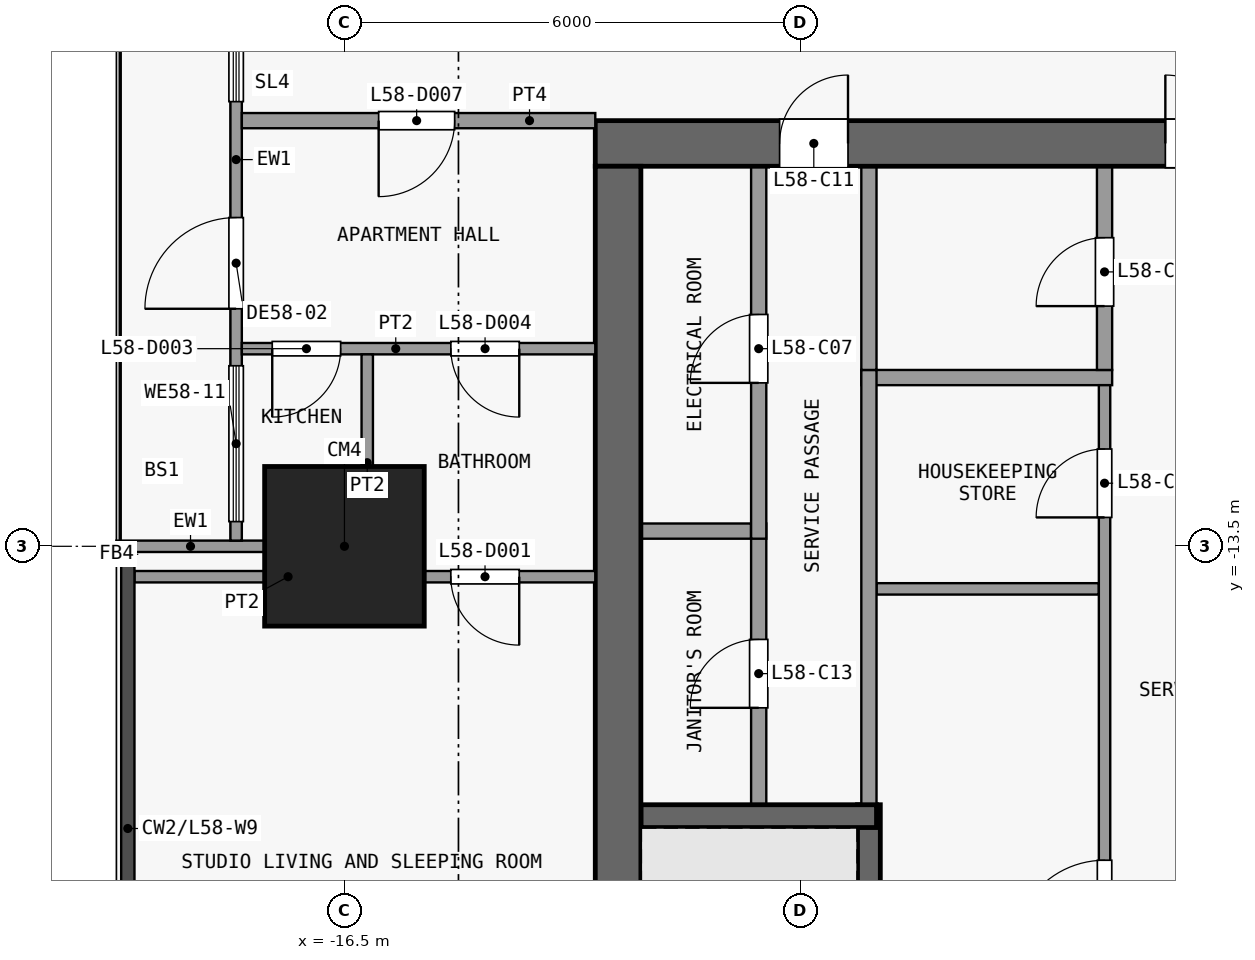
"""IFC4 building model, lengths in metres.
Left out: names, types, materials, properties, quantities, classifications, styles, units other than length and angle.
Written with IfcOpenShell. Run it as: python <this file> out.ifc"""

import sys

from ifc_helpers import new_model, si_unit, direction, frame, frame_2d, origin, origin_2d, place, context, subcontext, project, spatial, rectangle, extrude, element, fill, save


model = new_model("IFC4")
c1 = context("Model", 3, precision=1e-05, world=origin(), true_north=direction((0.0, 1.0)))
c2 = subcontext(c1, "Body", "Model", "MODEL_VIEW")
j1 = project(units=[si_unit("LENGTHUNIT", "METRE"), si_unit("PLANEANGLEUNIT", "RADIAN")], contexts=[c1])
p1 = place(None, origin())
s1 = spatial("IfcSite", under=j1, at=p1, CompositionType="ELEMENT")
p2 = place(p1, origin())
s2 = spatial("IfcBuilding", under=s1, at=p2, CompositionType="ELEMENT")
p3 = place(p2, frame((0.0, 0.0, 230.3)))
s3 = spatial("IfcBuildingStorey", under=s2, at=p3, CompositionType="ELEMENT", Elevation=230.3)
p4 = place(p3, frame((-16.5, -13.5, 0.0), z_axis=(0.0, 0.0, 1.0), x_axis=(1.0, 0.0, 0.0)))
e1 = element("IfcColumn", 1, at=p4, inside=s3, PredefinedType="COLUMN", context=c2, shape_type="SweptSolid", body=[
    extrude(rectangle(XDim=2.1, YDim=2.1, at=origin_2d()), origin(), (0.0, 0.0, 1.0), 3.6),
])
p5 = place(p3, frame((-13.2, -8.2, 0.0), z_axis=(0.0, 0.0, 1.0), x_axis=(1.0, 0.0, 0.0)))
e2 = element("IfcWall", 2, at=p5, inside=s3, PredefinedType="SHEAR", context=c2, shape_type="SweptSolid", body=[
    extrude(rectangle(XDim=26.4, YDim=0.6, at=frame_2d((13.2, 0.0))), origin(), (0.0, 0.0, 1.0), 3.3),
])
p6 = place(p5, frame((7.5, 0.0, 0.0)))
e3 = element("IfcOpeningElement", 3, at=p6, cuts=e2, PredefinedType="OPENING", context=c2, shape_type="SweptSolid", body=[
    extrude(rectangle(XDim=1.8, YDim=2.1, at=frame_2d((0.9, 1.05))), frame((0.0, 0.31, 0.0), z_axis=(0.0, -1.0, 0.0), x_axis=(1.0, 0.0, 0.0)), (0.0, 0.0, 1.0), 0.62),
])
p7 = place(p5, frame((17.1, 0.0, 0.0)))
e4 = element("IfcOpeningElement", 4, at=p7, cuts=e2, PredefinedType="OPENING", context=c2, shape_type="SweptSolid", body=[
    extrude(rectangle(XDim=1.8, YDim=2.1, at=frame_2d((0.9, 1.05))), frame((0.0, 0.31, 0.0), z_axis=(0.0, -1.0, 0.0), x_axis=(1.0, 0.0, 0.0)), (0.0, 0.0, 1.0), 0.62),
])
p8 = place(p5, frame((2.425, 0.0, 0.0)))
e5 = element("IfcOpeningElement", 5, at=p8, cuts=e2, PredefinedType="OPENING", context=c2, shape_type="SweptSolid", body=[
    extrude(rectangle(XDim=0.9, YDim=2.1, at=frame_2d((0.45, 1.05))), frame((0.0, 0.31, 0.0), z_axis=(0.0, -1.0, 0.0), x_axis=(1.0, 0.0, 0.0)), (0.0, 0.0, 1.0), 0.62),
])
p9 = place(p5, frame((23.075, 0.0, 0.0)))
e6 = element("IfcOpeningElement", 6, at=p9, cuts=e2, PredefinedType="OPENING", context=c2, shape_type="SweptSolid", body=[
    extrude(rectangle(XDim=0.9, YDim=2.1, at=frame_2d((0.45, 1.05))), frame((0.0, 0.31, 0.0), z_axis=(0.0, -1.0, 0.0), x_axis=(1.0, 0.0, 0.0)), (0.0, 0.0, 1.0), 0.62),
])
p10 = place(p3, frame((-12.9, -24.6, 0.0), z_axis=(0.0, 0.0, 1.0), x_axis=(0.0, 1.0, 0.0)))
e7 = element("IfcWall", 7, at=p10, inside=s3, PredefinedType="SHEAR", context=c2, shape_type="SweptSolid", body=[
    extrude(rectangle(XDim=16.1, YDim=0.6, at=frame_2d((8.05, 0.0))), origin(), (0.0, 0.0, 1.0), 3.3),
])
p11 = place(p3, frame((-12.6, -17.05, 0.0), z_axis=(0.0, 0.0, 1.0), x_axis=(1.0, 0.0, 0.0)))
e8 = element("IfcWall", 8, at=p11, inside=s3, PredefinedType="SHEAR", context=c2, shape_type="SweptSolid", body=[
    extrude(rectangle(XDim=3.1, YDim=0.3, at=frame_2d((1.55, 0.0))), origin(), (0.0, 0.0, 1.0), 3.3),
])
p12 = place(p3, frame((-9.5, -14.06, 0.0), z_axis=(0.0, 0.0, 1.0), x_axis=(1.0, 0.0, 0.0)))
e9 = element("IfcWall", 9, at=p12, inside=s3, PredefinedType="PARTITIONING", context=c2, shape_type="SweptSolid", body=[
    extrude(rectangle(XDim=2.925, YDim=0.15, at=frame_2d((1.462, 0.0))), origin(), (0.0, 0.0, 1.0), 3.3),
])
p13 = place(p3, frame((-12.6, -13.3, 0.0), z_axis=(0.0, 0.0, 1.0), x_axis=(1.0, 0.0, 0.0)))
e10 = element("IfcWall", 10, at=p13, inside=s3, PredefinedType="PARTITIONING", context=c2, shape_type="SweptSolid", body=[
    extrude(rectangle(XDim=1.45, YDim=0.2, at=frame_2d((0.725, 0.0))), origin(), (0.0, 0.0, 1.0), 3.3),
])
p14 = place(p3, frame((-9.7, -11.28, 0.0), z_axis=(0.0, 0.0, 1.0), x_axis=(1.0, 0.0, 0.0)))
e11 = element("IfcWall", 11, at=p14, inside=s3, PredefinedType="PARTITIONING", context=c2, shape_type="SweptSolid", body=[
    extrude(rectangle(XDim=3.3, YDim=0.2, at=frame_2d((1.65, 0.0))), origin(), (0.0, 0.0, 1.0), 3.3),
])
p15 = place(p3, frame((-11.05, -16.9, 0.0), z_axis=(0.0, 0.0, 1.0), x_axis=(0.0, 1.0, 0.0)))
e12 = element("IfcWall", 12, at=p15, inside=s3, PredefinedType="PARTITIONING", context=c2, shape_type="SweptSolid", body=[
    extrude(rectangle(XDim=3.7, YDim=0.2, at=frame_2d((1.85, 0.0))), origin(), (0.0, 0.0, 1.0), 3.3),
])
p16 = place(p15, frame((1.275, 0.0, 0.0)))
e13 = element("IfcOpeningElement", 13, at=p16, cuts=e12, PredefinedType="OPENING", context=c2, shape_type="SweptSolid", body=[
    extrude(rectangle(XDim=0.9, YDim=2.1, at=frame_2d((0.45, 1.05))), frame((0.0, 0.11, 0.0), z_axis=(0.0, -1.0, 0.0), x_axis=(1.0, 0.0, 0.0)), (0.0, 0.0, 1.0), 0.22),
])
p17 = place(p3, frame((-11.05, -13.4, 0.0), z_axis=(0.0, 0.0, 1.0), x_axis=(0.0, 1.0, 0.0)))
e14 = element("IfcWall", 14, at=p17, inside=s3, PredefinedType="PARTITIONING", context=c2, shape_type="SweptSolid", body=[
    extrude(rectangle(XDim=4.9, YDim=0.2, at=frame_2d((2.45, 0.0))), origin(), (0.0, 0.0, 1.0), 3.3),
])
p18 = place(p17, frame((2.05, 0.0, 0.0)))
e15 = element("IfcOpeningElement", 15, at=p18, cuts=e14, PredefinedType="OPENING", context=c2, shape_type="SweptSolid", body=[
    extrude(rectangle(XDim=0.9, YDim=2.1, at=frame_2d((0.45, 1.05))), frame((0.0, 0.11, 0.0), z_axis=(0.0, -1.0, 0.0), x_axis=(1.0, 0.0, 0.0)), (0.0, 0.0, 1.0), 0.22),
])
p19 = place(p3, frame((-9.6, -24.6, 0.0), z_axis=(0.0, 0.0, 1.0), x_axis=(0.0, 1.0, 0.0)))
e16 = element("IfcWall", 16, at=p19, inside=s3, PredefinedType="SHEAR", context=c2, shape_type="SweptSolid", body=[
    extrude(rectangle(XDim=7.7, YDim=0.3, at=frame_2d((3.85, 0.0))), origin(), (0.0, 0.0, 1.0), 3.3),
])
p20 = place(p19, frame((0.1, 0.0, 0.0)))
e17 = element("IfcOpeningElement", 17, at=p20, cuts=e16, PredefinedType="OPENING", context=c2, shape_type="SweptSolid", body=[
    extrude(rectangle(XDim=1.1, YDim=2.1, at=frame_2d((0.55, 1.05))), frame((0.0, 0.16, 0.0), z_axis=(0.0, -1.0, 0.0), x_axis=(1.0, 0.0, 0.0)), (0.0, 0.0, 1.0), 0.32),
])
p21 = place(p3, frame((-9.6, -16.9, 0.0), z_axis=(0.0, 0.0, 1.0), x_axis=(0.0, 1.0, 0.0)))
e18 = element("IfcWall", 18, at=p21, inside=s3, PredefinedType="PARTITIONING", context=c2, shape_type="SweptSolid", body=[
    extrude(rectangle(XDim=5.72, YDim=0.2, at=frame_2d((2.86, 0.0))), origin(), (0.0, 0.0, 1.0), 3.3),
])
p22 = place(p3, frame((-9.6, -11.18, 0.0), z_axis=(0.0, 0.0, 1.0), x_axis=(0.0, 1.0, 0.0)))
e19 = element("IfcWall", 19, at=p22, inside=s3, PredefinedType="PARTITIONING", context=c2, shape_type="SweptSolid", body=[
    extrude(rectangle(XDim=2.68, YDim=0.2, at=frame_2d((1.34, 0.0))), origin(), (0.0, 0.0, 1.0), 3.3),
])
p23 = place(p3, frame((-6.5, -22.3, 0.0), z_axis=(0.0, 0.0, 1.0), x_axis=(0.0, 1.0, 0.0)))
e20 = element("IfcWall", 20, at=p23, inside=s3, PredefinedType="PARTITIONING", context=c2, shape_type="SweptSolid", body=[
    extrude(rectangle(XDim=10.92, YDim=0.15, at=frame_2d((5.46, 0.0))), origin(), (0.0, 0.0, 1.0), 3.3),
])
p24 = place(p23, frame((3.47, 0.0, 0.0)))
e21 = element("IfcOpeningElement", 21, at=p24, cuts=e20, PredefinedType="OPENING", context=c2, shape_type="SweptSolid", body=[
    extrude(rectangle(XDim=1.2, YDim=2.1, at=frame_2d((0.6, 1.05))), frame((0.0, 0.085, 0.0), z_axis=(0.0, -1.0, 0.0), x_axis=(1.0, 0.0, 0.0)), (0.0, 0.0, 1.0), 0.17),
])
p25 = place(p23, frame((9.18, 0.0, 0.0)))
e22 = element("IfcOpeningElement", 22, at=p25, cuts=e20, PredefinedType="OPENING", context=c2, shape_type="SweptSolid", body=[
    extrude(rectangle(XDim=0.9, YDim=2.1, at=frame_2d((0.45, 1.05))), frame((0.0, 0.085, 0.0), z_axis=(0.0, -1.0, 0.0), x_axis=(1.0, 0.0, 0.0)), (0.0, 0.0, 1.0), 0.17),
])
p26 = place(p3, frame((-6.5, -11.18, 0.0), z_axis=(0.0, 0.0, 1.0), x_axis=(0.0, 1.0, 0.0)))
e23 = element("IfcWall", 23, at=p26, inside=s3, PredefinedType="PARTITIONING", context=c2, shape_type="SweptSolid", body=[
    extrude(rectangle(XDim=2.68, YDim=0.2, at=frame_2d((1.34, 0.0))), origin(), (0.0, 0.0, 1.0), 3.3),
])
p27 = place(p26, frame((0.84, 0.0, 0.0)))
e24 = element("IfcOpeningElement", 24, at=p27, cuts=e23, PredefinedType="OPENING", context=c2, shape_type="SweptSolid", body=[
    extrude(rectangle(XDim=0.9, YDim=2.1, at=frame_2d((0.45, 1.05))), frame((0.0, 0.11, 0.0), z_axis=(0.0, -1.0, 0.0), x_axis=(1.0, 0.0, 0.0)), (0.0, 0.0, 1.0), 0.22),
])
p28 = place(p3, frame((-17.55, -13.5, 0.0), z_axis=(0.0, 0.0, 1.0), x_axis=(-1.0, 0.0, 0.0)))
e25 = element("IfcWall", 25, at=p28, inside=s3, PredefinedType="SOLIDWALL", context=c2, shape_type="SweptSolid", body=[
    extrude(rectangle(XDim=1.95, YDim=0.15, at=frame_2d((0.975, 0.0))), origin(), (0.0, 0.0, 1.0), 3.3),
])
p29 = place(p3, frame((-17.925, -13.425, 0.0), z_axis=(0.0, 0.0, 1.0), x_axis=(0.0, 1.0, 0.0)))
e26 = element("IfcWall", 26, at=p29, inside=s3, PredefinedType="SOLIDWALL", context=c2, shape_type="SweptSolid", body=[
    extrude(rectangle(XDim=8.85, YDim=0.15, at=frame_2d((4.425, 0.0))), origin(), (0.0, 0.0, 1.0), 3.3),
])
p30 = place(p29, frame((3.05, 0.0, 0.0)))
e27 = element("IfcOpeningElement", 27, at=p30, cuts=e26, PredefinedType="OPENING", context=c2, shape_type="SweptSolid", body=[
    extrude(rectangle(XDim=1.2, YDim=2.4, at=frame_2d((0.6, 1.2))), frame((0.0, 0.085, 0.0), z_axis=(0.0, -1.0, 0.0), x_axis=(1.0, 0.0, 0.0)), (0.0, 0.0, 1.0), 0.17),
])
p31 = place(p29, frame((0.25, 0.0, 0.9)))
e28 = element("IfcOpeningElement", 28, at=p31, cuts=e26, PredefinedType="OPENING", context=c2, shape_type="SweptSolid", body=[
    extrude(rectangle(XDim=2.05, YDim=2.1, at=frame_2d((1.025, 1.05))), frame((0.0, 0.085, 0.0), z_axis=(0.0, -1.0, 0.0), x_axis=(1.0, 0.0, 0.0)), (0.0, 0.0, 1.0), 0.17),
])
p32 = place(p29, frame((5.775, 0.0, 0.9)))
e29 = element("IfcOpeningElement", 29, at=p32, cuts=e26, PredefinedType="OPENING", context=c2, shape_type="SweptSolid", body=[
    extrude(rectangle(XDim=2.275, YDim=2.1, at=frame_2d((1.137, 1.05))), frame((0.0, 0.085, 0.0), z_axis=(0.0, -1.0, 0.0), x_axis=(1.0, 0.0, 0.0)), (0.0, 0.0, 1.0), 0.17),
])
p33 = place(p3, frame((-19.262, -13.9, 0.0), z_axis=(0.0, 0.0, 1.0), x_axis=(1.0, 0.0, 0.0)))
e30 = element("IfcWall", 30, at=p33, inside=s3, PredefinedType="PARTITIONING", context=c2, shape_type="SweptSolid", body=[
    extrude(rectangle(XDim=6.062, YDim=0.15, at=frame_2d((3.031, 0.0))), origin(), (0.0, 0.0, 1.0), 3.3),
])
p34 = place(p33, frame((4.162, 0.0, 0.0)))
e31 = element("IfcOpeningElement", 31, at=p34, cuts=e30, PredefinedType="OPENING", context=c2, shape_type="SweptSolid", body=[
    extrude(rectangle(XDim=0.9, YDim=2.1, at=frame_2d((0.45, 1.05))), frame((0.0, 0.085, 0.0), z_axis=(0.0, -1.0, 0.0), x_axis=(1.0, 0.0, 0.0)), (0.0, 0.0, 1.0), 0.17),
])
p35 = place(p3, frame((-17.85, -10.9, 0.0), z_axis=(0.0, 0.0, 1.0), x_axis=(1.0, 0.0, 0.0)))
e32 = element("IfcWall", 32, at=p35, inside=s3, PredefinedType="PARTITIONING", context=c2, shape_type="SweptSolid", body=[
    extrude(rectangle(XDim=4.65, YDim=0.15, at=frame_2d((2.325, 0.0))), origin(), (0.0, 0.0, 1.0), 3.3),
])
p36 = place(p35, frame((0.4, 0.0, 0.0)))
e33 = element("IfcOpeningElement", 33, at=p36, cuts=e32, PredefinedType="OPENING", context=c2, shape_type="SweptSolid", body=[
    extrude(rectangle(XDim=0.9, YDim=2.1, at=frame_2d((0.45, 1.05))), frame((0.0, 0.085, 0.0), z_axis=(0.0, -1.0, 0.0), x_axis=(1.0, 0.0, 0.0)), (0.0, 0.0, 1.0), 0.17),
])
p37 = place(p35, frame((2.75, 0.0, 0.0)))
e34 = element("IfcOpeningElement", 34, at=p37, cuts=e32, PredefinedType="OPENING", context=c2, shape_type="SweptSolid", body=[
    extrude(rectangle(XDim=0.9, YDim=2.1, at=frame_2d((0.45, 1.05))), frame((0.0, 0.085, 0.0), z_axis=(0.0, -1.0, 0.0), x_axis=(1.0, 0.0, 0.0)), (0.0, 0.0, 1.0), 0.17),
])
p38 = place(p3, frame((-17.85, -7.9, 0.0), z_axis=(0.0, 0.0, 1.0), x_axis=(1.0, 0.0, 0.0)))
e35 = element("IfcWall", 35, at=p38, inside=s3, PredefinedType="PARTITIONING", context=c2, shape_type="SweptSolid", body=[
    extrude(rectangle(XDim=4.65, YDim=0.2, at=frame_2d((2.325, 0.0))), origin(), (0.0, 0.0, 1.0), 3.3),
])
p39 = place(p38, frame((1.8, 0.0, 0.0)))
e36 = element("IfcOpeningElement", 36, at=p39, cuts=e35, PredefinedType="OPENING", context=c2, shape_type="SweptSolid", body=[
    extrude(rectangle(XDim=1.0, YDim=2.1, at=frame_2d((0.5, 1.05))), frame((0.0, 0.11, 0.0), z_axis=(0.0, -1.0, 0.0), x_axis=(1.0, 0.0, 0.0)), (0.0, 0.0, 1.0), 0.22),
])
p40 = place(p3, frame((-16.2, -13.825, 0.0), z_axis=(0.0, 0.0, 1.0), x_axis=(0.0, 1.0, 0.0)))
e37 = element("IfcWall", 37, at=p40, inside=s3, PredefinedType="PARTITIONING", context=c2, shape_type="SweptSolid", body=[
    extrude(rectangle(XDim=2.85, YDim=0.15, at=frame_2d((1.425, 0.0))), origin(), (0.0, 0.0, 1.0), 3.3),
])
p41 = place(p6, origin())
e38 = element("IfcDoor", 38, at=p41, inside=s3, OperationType="DOUBLE_DOOR_SINGLE_SWING", PredefinedType="DOOR", context=c2, shape_type="SweptSolid", body=[
    extrude(rectangle(XDim=1.8, YDim=2.1, at=frame_2d((0.9, 1.05))), frame((0.0, 0.025, 0.0), z_axis=(0.0, -1.0, 0.0), x_axis=(1.0, 0.0, 0.0)), (0.0, 0.0, 1.0), 0.05),
])
fill(e3, e38)
p42 = place(p18, origin())
e39 = element("IfcDoor", 39, at=p42, inside=s3, OperationType="SINGLE_SWING_LEFT", PredefinedType="DOOR", context=c2, shape_type="SweptSolid", body=[
    extrude(rectangle(XDim=0.9, YDim=2.1, at=frame_2d((0.45, 1.05))), frame((0.0, 0.025, 0.0), z_axis=(0.0, -1.0, 0.0), x_axis=(1.0, 0.0, 0.0)), (0.0, 0.0, 1.0), 0.05),
])
fill(e15, e39)
p43 = place(p27, origin())
e40 = element("IfcDoor", 40, at=p43, inside=s3, OperationType="SINGLE_SWING_LEFT", PredefinedType="DOOR", context=c2, shape_type="SweptSolid", body=[
    extrude(rectangle(XDim=0.9, YDim=2.1, at=frame_2d((0.45, 1.05))), frame((0.0, 0.025, 0.0), z_axis=(0.0, -1.0, 0.0), x_axis=(1.0, 0.0, 0.0)), (0.0, 0.0, 1.0), 0.05),
])
fill(e24, e40)
p44 = place(p8, origin())
e41 = element("IfcDoor", 41, at=p44, inside=s3, OperationType="SINGLE_SWING_RIGHT", PredefinedType="DOOR", context=c2, shape_type="SweptSolid", body=[
    extrude(rectangle(XDim=0.9, YDim=2.1, at=frame_2d((0.45, 1.05))), frame((0.0, 0.025, 0.0), z_axis=(0.0, -1.0, 0.0), x_axis=(1.0, 0.0, 0.0)), (0.0, 0.0, 1.0), 0.05),
])
fill(e5, e41)
p45 = place(p16, origin())
e42 = element("IfcDoor", 42, at=p45, inside=s3, OperationType="SINGLE_SWING_LEFT", PredefinedType="DOOR", context=c2, shape_type="SweptSolid", body=[
    extrude(rectangle(XDim=0.9, YDim=2.1, at=frame_2d((0.45, 1.05))), frame((0.0, 0.025, 0.0), z_axis=(0.0, -1.0, 0.0), x_axis=(1.0, 0.0, 0.0)), (0.0, 0.0, 1.0), 0.05),
])
fill(e13, e42)
p46 = place(p24, origin())
e43 = element("IfcDoor", 43, at=p46, inside=s3, OperationType="SINGLE_SWING_LEFT", PredefinedType="DOOR", context=c2, shape_type="SweptSolid", body=[
    extrude(rectangle(XDim=1.2, YDim=2.1, at=frame_2d((0.6, 1.05))), frame((0.0, 0.025, 0.0), z_axis=(0.0, -1.0, 0.0), x_axis=(1.0, 0.0, 0.0)), (0.0, 0.0, 1.0), 0.05),
])
fill(e21, e43)
p47 = place(p25, origin())
e44 = element("IfcDoor", 44, at=p47, inside=s3, OperationType="SINGLE_SWING_LEFT", PredefinedType="DOOR", context=c2, shape_type="SweptSolid", body=[
    extrude(rectangle(XDim=0.9, YDim=2.1, at=frame_2d((0.45, 1.05))), frame((0.0, 0.025, 0.0), z_axis=(0.0, -1.0, 0.0), x_axis=(1.0, 0.0, 0.0)), (0.0, 0.0, 1.0), 0.05),
])
fill(e22, e44)
p48 = place(p30, origin())
e45 = element("IfcDoor", 45, at=p48, inside=s3, OperationType="SINGLE_SWING_LEFT", PredefinedType="DOOR", context=c2, shape_type="SweptSolid", body=[
    extrude(rectangle(XDim=1.2, YDim=2.4, at=frame_2d((0.6, 1.2))), frame((0.0, 0.025, 0.0), z_axis=(0.0, -1.0, 0.0), x_axis=(1.0, 0.0, 0.0)), (0.0, 0.0, 1.0), 0.05),
])
fill(e27, e45)
p49 = place(p31, origin())
e46 = element("IfcWindow", 46, at=p49, inside=s3, PartitioningType="SINGLE_PANEL", PredefinedType="WINDOW", context=c2, shape_type="SweptSolid", body=[
    extrude(rectangle(XDim=2.05, YDim=2.1, at=frame_2d((1.025, 1.05))), frame((0.0, 0.03, 0.0), z_axis=(0.0, -1.0, 0.0), x_axis=(1.0, 0.0, 0.0)), (0.0, 0.0, 1.0), 0.06),
])
fill(e28, e46)
p50 = place(p32, origin())
e47 = element("IfcWindow", 47, at=p50, inside=s3, PartitioningType="SINGLE_PANEL", PredefinedType="WINDOW", context=c2, shape_type="SweptSolid", body=[
    extrude(rectangle(XDim=2.275, YDim=2.1, at=frame_2d((1.137, 1.05))), frame((0.0, 0.03, 0.0), z_axis=(0.0, -1.0, 0.0), x_axis=(1.0, 0.0, 0.0)), (0.0, 0.0, 1.0), 0.06),
])
fill(e29, e47)
p51 = place(p34, origin())
e48 = element("IfcDoor", 48, at=p51, inside=s3, OperationType="SINGLE_SWING_RIGHT", PredefinedType="DOOR", context=c2, shape_type="SweptSolid", body=[
    extrude(rectangle(XDim=0.9, YDim=2.1, at=frame_2d((0.45, 1.05))), frame((0.0, 0.025, 0.0), z_axis=(0.0, -1.0, 0.0), x_axis=(1.0, 0.0, 0.0)), (0.0, 0.0, 1.0), 0.05),
])
fill(e31, e48)
p52 = place(p36, origin())
e49 = element("IfcDoor", 49, at=p52, inside=s3, OperationType="SINGLE_SWING_LEFT", PredefinedType="DOOR", context=c2, shape_type="SweptSolid", body=[
    extrude(rectangle(XDim=0.9, YDim=2.1, at=frame_2d((0.45, 1.05))), frame((0.0, 0.025, 0.0), z_axis=(0.0, -1.0, 0.0), x_axis=(1.0, 0.0, 0.0)), (0.0, 0.0, 1.0), 0.05),
])
fill(e33, e49)
p53 = place(p37, origin())
e50 = element("IfcDoor", 50, at=p53, inside=s3, OperationType="SINGLE_SWING_RIGHT", PredefinedType="DOOR", context=c2, shape_type="SweptSolid", body=[
    extrude(rectangle(XDim=0.9, YDim=2.1, at=frame_2d((0.45, 1.05))), frame((0.0, 0.025, 0.0), z_axis=(0.0, -1.0, 0.0), x_axis=(1.0, 0.0, 0.0)), (0.0, 0.0, 1.0), 0.05),
])
fill(e34, e50)
p54 = place(p39, origin())
e51 = element("IfcDoor", 51, at=p54, inside=s3, OperationType="SINGLE_SWING_LEFT", PredefinedType="DOOR", context=c2, shape_type="SweptSolid", body=[
    extrude(rectangle(XDim=1.0, YDim=2.1, at=frame_2d((0.5, 1.05))), frame((0.0, 0.025, 0.0), z_axis=(0.0, -1.0, 0.0), x_axis=(1.0, 0.0, 0.0)), (0.0, 0.0, 1.0), 0.05),
])
fill(e36, e51)
save(model, sys.argv[1])
